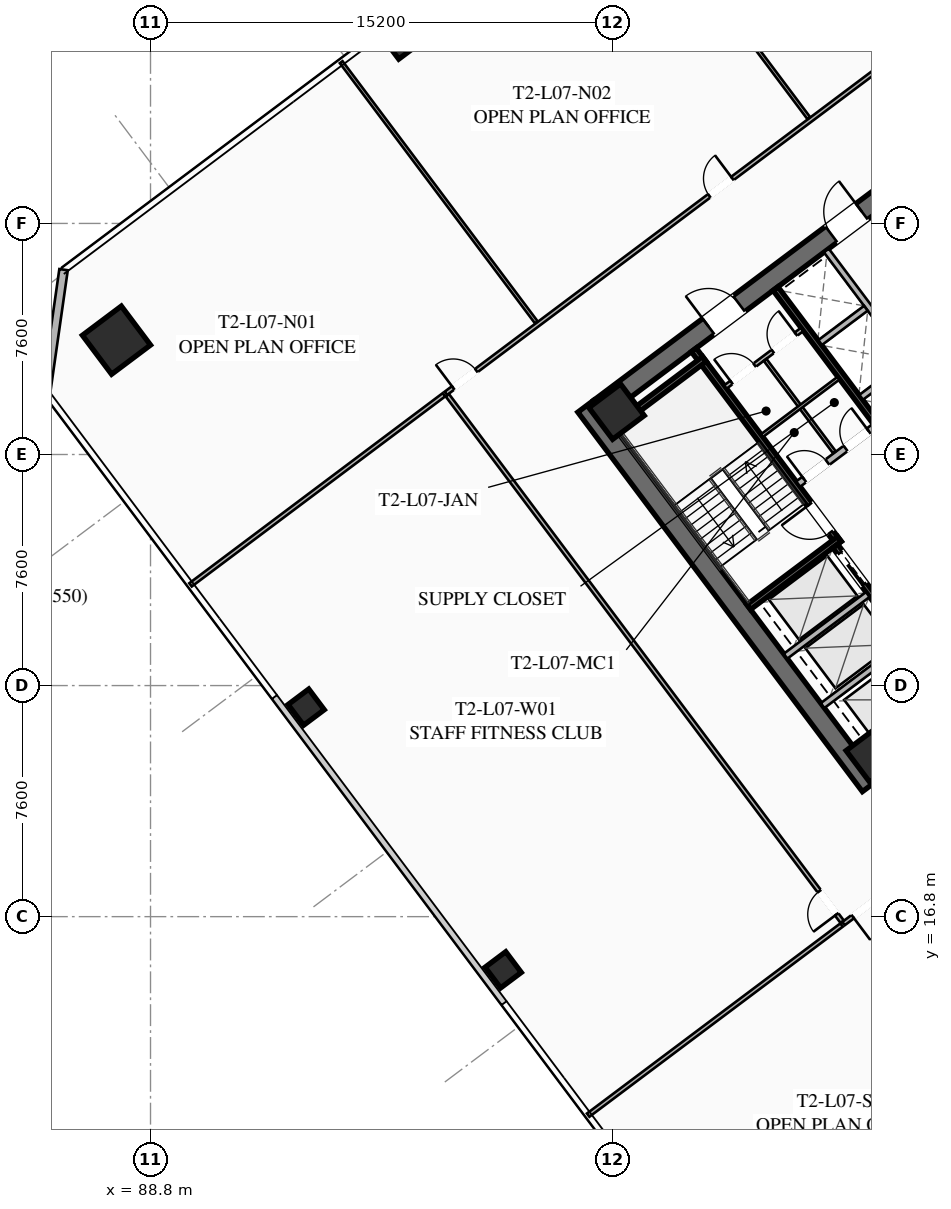
"""IFC4 building model, lengths in metres.
Left out: names, types, materials, properties, quantities, classifications, styles, units other than length and angle.
Written with IfcOpenShell. Run it as: python <this file> out.ifc"""

import sys

from ifc_helpers import new_model, si_unit, direction, frame, frame_2d, origin, origin_2d, place, context, subcontext, project, spatial, rectangle, hollow_rectangle, extrude, element, fill, save


model = new_model("IFC4")
c1 = context("Model", 3, precision=1e-05, world=origin(), true_north=direction((0.0, 1.0)))
c2 = subcontext(c1, "Body", "Model", "MODEL_VIEW")
j1 = project(units=[si_unit("LENGTHUNIT", "METRE"), si_unit("PLANEANGLEUNIT", "RADIAN")], contexts=[c1])
p1 = place(None, origin())
s1 = spatial("IfcSite", under=j1, at=p1, CompositionType="ELEMENT")
p2 = place(p1, origin())
s2 = spatial("IfcBuilding", under=s1, at=p2, CompositionType="ELEMENT")
p3 = place(p2, frame((0.0, 0.0, 31.7)))
s3 = spatial("IfcBuildingStorey", under=s2, at=p3, CompositionType="ELEMENT", Elevation=31.7)
p4 = place(p3, frame((112.476, 21.107, 0.0), z_axis=(0.0, 0.0, 1.0), x_axis=(-0.600005007985, 0.799996243986, 0.0)))
e1 = element("IfcWall", 1, at=p4, inside=s3, PredefinedType="SHEAR", context=c2, shape_type="SweptSolid", body=[
    extrude(rectangle(XDim=15.6, YDim=0.65, at=frame_2d((7.8, 0.0))), origin(), (0.0, 0.0, 1.0), 3.55),
])
p5 = place(p3, frame((124.429, 30.478, 0.0), z_axis=(0.0, 0.0, 1.0), x_axis=(-0.799998028465, -0.600002628705, 0.0)))
e2 = element("IfcWall", 2, at=p5, inside=s3, PredefinedType="SHEAR", context=c2, shape_type="SweptSolid", body=[
    extrude(rectangle(XDim=14.86, YDim=0.65, at=frame_2d((7.43, 0.0))), origin(), (0.0, 0.0, 1.0), 3.55),
])
p6 = place(p5, frame((9.13, 0.0, 0.0)))
e3 = element("IfcOpeningElement", 3, at=p6, cuts=e2, PredefinedType="OPENING", context=c2, shape_type="SweptSolid", body=[
    extrude(rectangle(XDim=1.25, YDim=2.25, at=frame_2d((0.625, 1.125))), frame((0.0, 0.335, 0.0), z_axis=(0.0, -1.0, 0.0), x_axis=(1.0, 0.0, 0.0)), (0.0, 0.0, 1.0), 0.67),
])
p7 = place(p5, frame((4.08, 0.0, 0.0)))
e4 = element("IfcOpeningElement", 4, at=p7, cuts=e2, PredefinedType="OPENING", context=c2, shape_type="SweptSolid", body=[
    extrude(rectangle(XDim=1.25, YDim=2.25, at=frame_2d((0.625, 1.125))), frame((0.0, 0.335, 0.0), z_axis=(0.0, -1.0, 0.0), x_axis=(1.0, 0.0, 0.0)), (0.0, 0.0, 1.0), 0.67),
])
p8 = place(p3, frame((103.571, 33.522, 0.0), z_axis=(0.0, 0.0, 1.0), x_axis=(0.799998028465, 0.600002628705, 0.0)))
e5 = element("IfcWall", 5, at=p8, inside=s3, PredefinedType="SHEAR", context=c2, shape_type="SweptSolid", body=[
    extrude(rectangle(XDim=14.86, YDim=0.65, at=frame_2d((7.43, 0.0))), origin(), (0.0, 0.0, 1.0), 3.55),
])
p9 = place(p8, frame((4.48, 0.0, 0.0)))
e6 = element("IfcOpeningElement", 6, at=p9, cuts=e5, PredefinedType="OPENING", context=c2, shape_type="SweptSolid", body=[
    extrude(rectangle(XDim=1.25, YDim=2.25, at=frame_2d((0.625, 1.125))), frame((0.0, 0.335, 0.0), z_axis=(0.0, -1.0, 0.0), x_axis=(1.0, 0.0, 0.0)), (0.0, 0.0, 1.0), 0.67),
])
p10 = place(p8, frame((9.53, 0.0, 0.0)))
e7 = element("IfcOpeningElement", 7, at=p10, cuts=e5, PredefinedType="OPENING", context=c2, shape_type="SweptSolid", body=[
    extrude(rectangle(XDim=1.25, YDim=2.25, at=frame_2d((0.625, 1.125))), frame((0.0, 0.335, 0.0), z_axis=(0.0, -1.0, 0.0), x_axis=(1.0, 0.0, 0.0)), (0.0, 0.0, 1.0), 0.67),
])
for number, where, z_axis, x_axis in (
    (8, (112.59, 22.13, 0.0), (0.0, 0.0, 1.0), (0.8, 0.6, 0.0)),
    (9, (104.13, 33.41, 0.0), (0.0, 0.0, 1.0), (0.8, 0.6, 0.0)),
):
    element("IfcColumn", number, at=place(p3, frame(where, z_axis=z_axis, x_axis=x_axis)), inside=s3, PredefinedType="COLUMN", context=c2, shape_type="SweptSolid", body=[
        extrude(hollow_rectangle(XDim=1.3, YDim=1.3, WallThickness=0.05, at=origin_2d()), origin(), (0.0, 0.0, 1.0), 3.35),
    ])
p11 = place(p3, frame((87.68, 35.76, 0.0), z_axis=(0.0, 0.0, 1.0), x_axis=(0.799999996291, 0.600000004945, 0.0)))
e10 = element("IfcColumn", 10, at=p11, inside=s3, PredefinedType="COLUMN", context=c2, shape_type="SweptSolid", body=[
    extrude(hollow_rectangle(XDim=1.6, YDim=1.6, WallThickness=0.06, at=origin_2d()), origin(), (0.0, 0.0, 1.0), 3.35),
])
for number, where, z_axis, x_axis in (
    (11, (97.05, 45.6, 0.0), (0.0, 0.0, 1.0), (0.8, 0.6, 0.0)),
    (12, (93.92, 23.69, 0.0), (0.0, 0.0, 1.0), (0.8, 0.6, 0.0)),
    (13, (100.4, 15.05, 0.0), (0.0, 0.0, 1.0), (0.8, 0.6, 0.0)),
):
    element("IfcColumn", number, at=place(p3, frame(where, z_axis=z_axis, x_axis=x_axis)), inside=s3, PredefinedType="COLUMN", context=c2, shape_type="SweptSolid", body=[
        extrude(hollow_rectangle(XDim=0.85, YDim=0.85, WallThickness=0.035, at=origin_2d()), origin(), (0.0, 0.0, 1.0), 3.35),
    ])
p12 = place(p3, frame((85.36, 34.02, 0.0), z_axis=(0.0, 0.0, 1.0), x_axis=(0.14137968631, 0.989955445613, 0.0)))
e14 = element("IfcWall", 14, at=p12, inside=s3, PredefinedType="SOLIDWALL", context=c2, shape_type="SweptSolid", body=[
    extrude(rectangle(XDim=4.101, YDim=0.28, at=frame_2d((2.051, 0.0))), origin(), (0.0, 0.0, 1.0), 3.35),
])
p13 = place(p3, frame((111.44, 29.08, 0.0), z_axis=(0.0, 0.0, 1.0), x_axis=(-0.600009827119, 0.799992629566, 0.0)))
e15 = element("IfcWall", 15, at=p13, inside=s3, PredefinedType="SHEAR", context=c2, shape_type="SweptSolid", body=[
    extrude(rectangle(XDim=7.95, YDim=0.2, at=frame_2d((3.975, 0.0))), origin(), (0.0, 0.0, 1.0), 3.35),
])
p14 = place(p13, frame((0.45, 0.0, 0.0)))
e16 = element("IfcOpeningElement", 16, at=p14, cuts=e15, PredefinedType="OPENING", context=c2, shape_type="SweptSolid", body=[
    extrude(rectangle(XDim=1.15, YDim=2.2, at=frame_2d((0.575, 1.1))), frame((0.0, 0.11, 0.0), z_axis=(0.0, -1.0, 0.0), x_axis=(1.0, 0.0, 0.0)), (0.0, 0.0, 1.0), 0.22),
])
for number, where, z_axis, x_axis in (
    (17, (108.476, 26.982, 0.0), (0.0, 0.0, 1.0), (0.8, 0.6, 0.0)),
    (18, (104.036, 32.902, 0.0), (0.0, 0.0, 1.0), (0.8, 0.6, 0.0)),
):
    element("IfcWall", number, at=place(p3, frame(where, z_axis=z_axis, x_axis=x_axis)), inside=s3, PredefinedType="SHEAR", context=c2, shape_type="SweptSolid", body=[
        extrude(rectangle(XDim=3.73, YDim=0.2, at=frame_2d((1.865, 0.0))), origin(), (0.0, 0.0, 1.0), 3.35),
    ])
p15 = place(p3, frame((117.938, 26.016, 0.0), z_axis=(0.0, 0.0, 1.0), x_axis=(-0.600005463273, 0.799995902516, 0.0)))
e19 = element("IfcWall", 19, at=p15, inside=s3, PredefinedType="SHEAR", context=c2, shape_type="SweptSolid", body=[
    extrude(rectangle(XDim=14.3, YDim=0.2, at=frame_2d((7.15, 0.0))), origin(), (0.0, 0.0, 1.0), 3.35),
])
p16 = place(p3, frame((110.104, 31.028, 0.0), z_axis=(0.0, 0.0, 1.0), x_axis=(0.800018601094, 0.59997519774, 0.0)))
e20 = element("IfcWall", 20, at=p16, inside=s3, PredefinedType="SOLIDWALL", context=c2, shape_type="SweptSolid", body=[
    extrude(rectangle(XDim=3.15, YDim=0.22, at=frame_2d((1.575, 0.0))), origin(), (0.0, 0.0, 1.0), 2.703),
])
p17 = place(p16, frame((0.25, 0.0, 0.0)))
e21 = element("IfcOpeningElement", 21, at=p17, cuts=e20, PredefinedType="OPENING", context=c2, shape_type="SweptSolid", body=[
    extrude(rectangle(XDim=0.95, YDim=2.05, at=frame_2d((0.475, 1.025))), frame((0.0, 0.12, 0.0), z_axis=(0.0, -1.0, 0.0), x_axis=(1.0, 0.0, 0.0)), (0.0, 0.0, 1.0), 0.24),
])
p18 = place(p16, frame((1.95, 0.0, 0.0)))
e22 = element("IfcOpeningElement", 22, at=p18, cuts=e20, PredefinedType="OPENING", context=c2, shape_type="SweptSolid", body=[
    extrude(rectangle(XDim=0.95, YDim=2.05, at=frame_2d((0.475, 1.025))), frame((0.0, 0.12, 0.0), z_axis=(0.0, -1.0, 0.0), x_axis=(1.0, 0.0, 0.0)), (0.0, 0.0, 1.0), 0.24),
])
p19 = place(p3, frame((115.13, 23.91, 0.0), z_axis=(0.0, 0.0, 1.0), x_axis=(-0.599975393228, 0.800018454488, 0.0)))
e23 = element("IfcWall", 23, at=p19, inside=s3, PredefinedType="SHEAR", context=c2, shape_type="SweptSolid", body=[
    extrude(rectangle(XDim=6.35, YDim=0.2, at=frame_2d((3.175, 0.0))), origin(), (0.0, 0.0, 1.0), 3.35),
])
p20 = place(p19, frame((4.775, 0.0, 0.0)))
e24 = element("IfcOpeningElement", 24, at=p20, cuts=e23, PredefinedType="OPENING", context=c2, shape_type="SweptSolid", body=[
    extrude(rectangle(XDim=1.3, YDim=2.25, at=frame_2d((0.65, 1.125))), frame((0.0, 0.11, 0.0), z_axis=(0.0, -1.0, 0.0), x_axis=(1.0, 0.0, 0.0)), (0.0, 0.0, 1.0), 0.22),
])
p21 = place(p19, frame((2.775, 0.0, 0.0)))
e25 = element("IfcOpeningElement", 25, at=p21, cuts=e23, PredefinedType="OPENING", context=c2, shape_type="SweptSolid", body=[
    extrude(rectangle(XDim=1.3, YDim=2.25, at=frame_2d((0.65, 1.125))), frame((0.0, 0.11, 0.0), z_axis=(0.0, -1.0, 0.0), x_axis=(1.0, 0.0, 0.0)), (0.0, 0.0, 1.0), 0.22),
])
p22 = place(p19, frame((0.575, 0.0, 0.0)))
e26 = element("IfcOpeningElement", 26, at=p22, cuts=e23, PredefinedType="OPENING", context=c2, shape_type="SweptSolid", body=[
    extrude(rectangle(XDim=1.3, YDim=2.25, at=frame_2d((0.65, 1.125))), frame((0.0, 0.11, 0.0), z_axis=(0.0, -1.0, 0.0), x_axis=(1.0, 0.0, 0.0)), (0.0, 0.0, 1.0), 0.22),
])
for number, where, z_axis, x_axis in (
    (27, (110.906, 23.742, 0.0), (0.0, 0.0, 1.0), (0.8, 0.6, 0.0)),
    (28, (109.688, 25.366, 0.0), (0.0, 0.0, 1.0), (0.8, 0.6, 0.0)),
):
    element("IfcWall", number, at=place(p3, frame(where, z_axis=z_axis, x_axis=x_axis)), inside=s3, PredefinedType="SOLIDWALL", context=c2, shape_type="SweptSolid", body=[
        extrude(rectangle(XDim=3.38, YDim=0.2, at=frame_2d((1.69, 0.0))), origin(), (0.0, 0.0, 1.0), 3.35),
    ])
p23 = place(p3, frame((107.71, 34.22, 0.0), z_axis=(0.0, 0.0, 1.0), x_axis=(0.799981399002, 0.60002480053, 0.0)))
e29 = element("IfcWall", 29, at=p23, inside=s3, PredefinedType="PARTITIONING", context=c2, shape_type="SweptSolid", body=[
    extrude(rectangle(XDim=3.15, YDim=0.135, at=frame_2d((1.575, 0.0))), origin(), (0.0, 0.0, 1.0), 2.703),
])
p24 = place(p23, frame((0.25, 0.0, 0.0)))
e30 = element("IfcOpeningElement", 30, at=p24, cuts=e29, PredefinedType="OPENING", context=c2, shape_type="SweptSolid", body=[
    extrude(rectangle(XDim=0.95, YDim=2.05, at=frame_2d((0.475, 1.025))), frame((0.0, 0.077, 0.0), z_axis=(0.0, -1.0, 0.0), x_axis=(1.0, 0.0, 0.0)), (0.0, 0.0, 1.0), 0.155),
])
p25 = place(p23, frame((1.95, 0.0, 0.0)))
e31 = element("IfcOpeningElement", 31, at=p25, cuts=e29, PredefinedType="OPENING", context=c2, shape_type="SweptSolid", body=[
    extrude(rectangle(XDim=0.95, YDim=2.05, at=frame_2d((0.475, 1.025))), frame((0.0, 0.077, 0.0), z_axis=(0.0, -1.0, 0.0), x_axis=(1.0, 0.0, 0.0)), (0.0, 0.0, 1.0), 0.155),
])
p26 = place(p3, frame((111.296, 32.072, 0.0), z_axis=(0.0, 0.0, 1.0), x_axis=(-0.59995887973, 0.800030838552, 0.0)))
e32 = element("IfcWall", 32, at=p26, inside=s3, PredefinedType="PARTITIONING", context=c2, shape_type="SweptSolid", body=[
    extrude(rectangle(XDim=3.8, YDim=0.11, at=frame_2d((1.9, 0.0))), origin(), (0.0, 0.0, 1.0), 2.703),
])
p27 = place(p3, frame((108.91, 32.62, 0.0), z_axis=(0.0, 0.0, 1.0), x_axis=(0.800018601094, 0.59997519774, 0.0)))
e33 = element("IfcWall", 33, at=p27, inside=s3, PredefinedType="PARTITIONING", context=c2, shape_type="SweptSolid", body=[
    extrude(rectangle(XDim=3.15, YDim=0.11, at=frame_2d((1.575, 0.0))), origin(), (0.0, 0.0, 1.0), 2.703),
])
p28 = place(p3, frame((115.11, 33.27, 0.0), z_axis=(0.0, 0.0, 1.0), x_axis=(-0.600011488909, 0.79999138319, 0.0)))
e34 = element("IfcWall", 34, at=p28, inside=s3, PredefinedType="SOLIDWALL", context=c2, shape_type="SweptSolid", body=[
    extrude(rectangle(XDim=6.8, YDim=0.2, at=frame_2d((3.4, 0.0))), origin(), (0.0, 0.0, 1.0), 3.35),
])
p29 = place(p3, frame((112.176, 33.882, 0.0), z_axis=(0.0, 0.0, 1.0), x_axis=(0.8, 0.6, 0.0)))
e35 = element("IfcWall", 35, at=p29, inside=s3, PredefinedType="SOLIDWALL", context=c2, shape_type="SweptSolid", body=[
    extrude(rectangle(XDim=1.88, YDim=0.2, at=frame_2d((0.94, 0.0))), origin(), (0.0, 0.0, 1.0), 3.35),
])
p30 = place(p3, frame((110.826, 35.682, 0.0), z_axis=(0.0, 0.0, 1.0), x_axis=(0.799984418148, 0.600020775241, 0.0)))
e36 = element("IfcWall", 36, at=p30, inside=s3, PredefinedType="SOLIDWALL", context=c2, shape_type="SweptSolid", body=[
    extrude(rectangle(XDim=1.88, YDim=0.2, at=frame_2d((0.94, 0.0))), origin(), (0.0, 0.0, 1.0), 3.35),
])
p31 = place(p3, frame((98.516, 34.012, 0.0), z_axis=(0.0, 0.0, 1.0), x_axis=(0.799998035726, 0.600002619023, 0.0)))
e37 = element("IfcWall", 37, at=p31, inside=s3, PredefinedType="PARTITIONING", context=c2, shape_type="SweptSolid", body=[
    extrude(rectangle(XDim=29.83, YDim=0.135, at=frame_2d((14.915, 0.0))), origin(), (0.0, 0.0, 1.0), 2.703),
])
p32 = place(p31, frame((0.3, 0.0, 0.0)))
e38 = element("IfcOpeningElement", 38, at=p32, cuts=e37, PredefinedType="OPENING", context=c2, shape_type="SweptSolid", body=[
    extrude(rectangle(XDim=0.95, YDim=2.05, at=frame_2d((0.475, 1.025))), frame((0.0, 0.077, 0.0), z_axis=(0.0, -1.0, 0.0), x_axis=(1.0, 0.0, 0.0)), (0.0, 0.0, 1.0), 0.155),
])
p33 = place(p31, frame((10.829, 0.0, 0.0)))
e39 = element("IfcOpeningElement", 39, at=p33, cuts=e37, PredefinedType="OPENING", context=c2, shape_type="SweptSolid", body=[
    extrude(rectangle(XDim=0.95, YDim=2.05, at=frame_2d((0.475, 1.025))), frame((0.0, 0.077, 0.0), z_axis=(0.0, -1.0, 0.0), x_axis=(1.0, 0.0, 0.0)), (0.0, 0.0, 1.0), 0.155),
])
p34 = place(p31, frame((28.58, 0.0, 0.0)))
e40 = element("IfcOpeningElement", 40, at=p34, cuts=e37, PredefinedType="OPENING", context=c2, shape_type="SweptSolid", body=[
    extrude(rectangle(XDim=0.95, YDim=2.05, at=frame_2d((0.475, 1.025))), frame((0.0, 0.077, 0.0), z_axis=(0.0, -1.0, 0.0), x_axis=(1.0, 0.0, 0.0)), (0.0, 0.0, 1.0), 0.155),
])
for number, where, z_axis, x_axis in (
    (41, (101.492, 36.344, 0.0), (0.0, 0.0, 1.0), (-0.6, 0.8, 0.0)),
    (42, (110.452, 43.064, 0.0), (0.0, 0.0, 1.0), (-0.6, 0.8, 0.0)),
):
    element("IfcWall", number, at=place(p3, frame(where, z_axis=z_axis, x_axis=x_axis)), inside=s3, PredefinedType="PARTITIONING", context=c2, shape_type="SweptSolid", body=[
        extrude(rectangle(XDim=10.7, YDim=0.11, at=frame_2d((5.35, 0.0))), origin(), (0.0, 0.0, 1.0), 2.703),
    ])
p35 = place(p3, frame((135.46, 34.47, 0.0), z_axis=(0.0, 0.0, 1.0), x_axis=(-0.800000982127, -0.599998690494, 0.0)))
e43 = element("IfcWall", 43, at=p35, inside=s3, PredefinedType="PARTITIONING", context=c2, shape_type="SweptSolid", body=[
    extrude(rectangle(XDim=29.83, YDim=0.135, at=frame_2d((14.915, 0.0))), origin(), (0.0, 0.0, 1.0), 2.703),
])
p36 = place(p35, frame((28.5, 0.0, 0.0)))
e44 = element("IfcOpeningElement", 44, at=p36, cuts=e43, PredefinedType="OPENING", context=c2, shape_type="SweptSolid", body=[
    extrude(rectangle(XDim=0.95, YDim=2.05, at=frame_2d((0.475, 1.025))), frame((0.0, 0.077, 0.0), z_axis=(0.0, -1.0, 0.0), x_axis=(1.0, 0.0, 0.0)), (0.0, 0.0, 1.0), 0.155),
])
p37 = place(p35, frame((18.075, 0.0, 0.0)))
e45 = element("IfcOpeningElement", 45, at=p37, cuts=e43, PredefinedType="OPENING", context=c2, shape_type="SweptSolid", body=[
    extrude(rectangle(XDim=0.95, YDim=2.05, at=frame_2d((0.475, 1.025))), frame((0.0, 0.077, 0.0), z_axis=(0.0, -1.0, 0.0), x_axis=(1.0, 0.0, 0.0)), (0.0, 0.0, 1.0), 0.155),
])
p38 = place(p35, frame((0.38, 0.0, 0.0)))
e46 = element("IfcOpeningElement", 46, at=p38, cuts=e43, PredefinedType="OPENING", context=c2, shape_type="SweptSolid", body=[
    extrude(rectangle(XDim=0.95, YDim=2.05, at=frame_2d((0.475, 1.025))), frame((0.0, 0.077, 0.0), z_axis=(0.0, -1.0, 0.0), x_axis=(1.0, 0.0, 0.0)), (0.0, 0.0, 1.0), 0.155),
])
p39 = place(p3, frame((111.548, 16.636, 0.0), z_axis=(0.0, 0.0, 1.0), x_axis=(-0.600003610192, 0.799997292343, 0.0)))
e47 = element("IfcWall", 47, at=p39, inside=s3, PredefinedType="PARTITIONING", context=c2, shape_type="SweptSolid", body=[
    extrude(rectangle(XDim=21.64, YDim=0.135, at=frame_2d((10.82, 0.0))), origin(), (0.0, 0.0, 1.0), 2.703),
])
p40 = place(p39, frame((0.3, 0.0, 0.0)))
e48 = element("IfcOpeningElement", 48, at=p40, cuts=e47, PredefinedType="OPENING", context=c2, shape_type="SweptSolid", body=[
    extrude(rectangle(XDim=0.95, YDim=2.05, at=frame_2d((0.475, 1.025))), frame((0.0, 0.077, 0.0), z_axis=(0.0, -1.0, 0.0), x_axis=(1.0, 0.0, 0.0)), (0.0, 0.0, 1.0), 0.155),
])
p41 = place(p3, frame((98.452, 33.964, 0.0), z_axis=(0.0, 0.0, 1.0), x_axis=(-0.799988753532, -0.600014994998, 0.0)))
e49 = element("IfcWall", 49, at=p41, inside=s3, PredefinedType="PARTITIONING", context=c2, shape_type="SweptSolid", body=[
    extrude(rectangle(XDim=10.42, YDim=0.135, at=frame_2d((5.21, 0.0))), origin(), (0.0, 0.0, 1.0), 2.703),
])
p42 = place(p3, frame((103.196, 10.272, 0.0), z_axis=(0.0, 0.0, 1.0), x_axis=(0.8, 0.6, 0.0)))
e50 = element("IfcWall", 50, at=p42, inside=s3, PredefinedType="PARTITIONING", context=c2, shape_type="SweptSolid", body=[
    extrude(rectangle(XDim=10.42, YDim=0.135, at=frame_2d((5.21, 0.0))), origin(), (0.0, 0.0, 1.0), 2.703),
])
p43 = place(p9, origin())
e51 = element("IfcDoor", 51, at=p43, inside=s3, OperationType="SINGLE_SWING_LEFT", PredefinedType="DOOR", context=c2, shape_type="SweptSolid", body=[
    extrude(rectangle(XDim=1.25, YDim=2.25, at=frame_2d((0.625, 1.125))), frame((0.0, 0.025, 0.0), z_axis=(0.0, -1.0, 0.0), x_axis=(1.0, 0.0, 0.0)), (0.0, 0.0, 1.0), 0.05),
])
fill(e6, e51)
p44 = place(p10, origin())
e52 = element("IfcDoor", 52, at=p44, inside=s3, OperationType="SINGLE_SWING_RIGHT", PredefinedType="DOOR", context=c2, shape_type="SweptSolid", body=[
    extrude(rectangle(XDim=1.25, YDim=2.25, at=frame_2d((0.625, 1.125))), frame((0.0, 0.025, 0.0), z_axis=(0.0, -1.0, 0.0), x_axis=(1.0, 0.0, 0.0)), (0.0, 0.0, 1.0), 0.05),
])
fill(e7, e52)
p45 = place(p14, origin())
e53 = element("IfcDoor", 53, at=p45, inside=s3, OperationType="SINGLE_SWING_RIGHT", PredefinedType="DOOR", context=c2, shape_type="SweptSolid", body=[
    extrude(rectangle(XDim=1.15, YDim=2.2, at=frame_2d((0.575, 1.1))), frame((0.0, 0.025, 0.0), z_axis=(0.0, -1.0, 0.0), x_axis=(1.0, 0.0, 0.0)), (0.0, 0.0, 1.0), 0.05),
])
fill(e16, e53)
p46 = place(p24, origin())
e54 = element("IfcDoor", 54, at=p46, inside=s3, OperationType="SINGLE_SWING_LEFT", PredefinedType="DOOR", context=c2, shape_type="SweptSolid", body=[
    extrude(rectangle(XDim=0.95, YDim=2.05, at=frame_2d((0.475, 1.025))), frame((0.0, 0.025, 0.0), z_axis=(0.0, -1.0, 0.0), x_axis=(1.0, 0.0, 0.0)), (0.0, 0.0, 1.0), 0.05),
])
fill(e30, e54)
p47 = place(p25, origin())
e55 = element("IfcDoor", 55, at=p47, inside=s3, OperationType="SINGLE_SWING_RIGHT", PredefinedType="DOOR", context=c2, shape_type="SweptSolid", body=[
    extrude(rectangle(XDim=0.95, YDim=2.05, at=frame_2d((0.475, 1.025))), frame((0.0, 0.025, 0.0), z_axis=(0.0, -1.0, 0.0), x_axis=(1.0, 0.0, 0.0)), (0.0, 0.0, 1.0), 0.05),
])
fill(e31, e55)
p48 = place(p17, origin())
e56 = element("IfcDoor", 56, at=p48, inside=s3, OperationType="SINGLE_SWING_LEFT", PredefinedType="DOOR", context=c2, shape_type="SweptSolid", body=[
    extrude(rectangle(XDim=0.95, YDim=2.05, at=frame_2d((0.475, 1.025))), frame((0.0, 0.025, 0.0), z_axis=(0.0, -1.0, 0.0), x_axis=(1.0, 0.0, 0.0)), (0.0, 0.0, 1.0), 0.05),
])
fill(e21, e56)
p49 = place(p18, origin())
e57 = element("IfcDoor", 57, at=p49, inside=s3, OperationType="SINGLE_SWING_RIGHT", PredefinedType="DOOR", context=c2, shape_type="SweptSolid", body=[
    extrude(rectangle(XDim=0.95, YDim=2.05, at=frame_2d((0.475, 1.025))), frame((0.0, 0.025, 0.0), z_axis=(0.0, -1.0, 0.0), x_axis=(1.0, 0.0, 0.0)), (0.0, 0.0, 1.0), 0.05),
])
fill(e22, e57)
p50 = place(p32, origin())
e58 = element("IfcDoor", 58, at=p50, inside=s3, OperationType="SINGLE_SWING_LEFT", PredefinedType="DOOR", context=c2, shape_type="SweptSolid", body=[
    extrude(rectangle(XDim=0.95, YDim=2.05, at=frame_2d((0.475, 1.025))), frame((0.0, 0.025, 0.0), z_axis=(0.0, -1.0, 0.0), x_axis=(1.0, 0.0, 0.0)), (0.0, 0.0, 1.0), 0.05),
])
fill(e38, e58)
p51 = place(p33, origin())
e59 = element("IfcDoor", 59, at=p51, inside=s3, OperationType="SINGLE_SWING_RIGHT", PredefinedType="DOOR", context=c2, shape_type="SweptSolid", body=[
    extrude(rectangle(XDim=0.95, YDim=2.05, at=frame_2d((0.475, 1.025))), frame((0.0, 0.025, 0.0), z_axis=(0.0, -1.0, 0.0), x_axis=(1.0, 0.0, 0.0)), (0.0, 0.0, 1.0), 0.05),
])
fill(e39, e59)
p52 = place(p36, origin())
e60 = element("IfcDoor", 60, at=p52, inside=s3, OperationType="SINGLE_SWING_RIGHT", PredefinedType="DOOR", context=c2, shape_type="SweptSolid", body=[
    extrude(rectangle(XDim=0.95, YDim=2.05, at=frame_2d((0.475, 1.025))), frame((0.0, 0.025, 0.0), z_axis=(0.0, -1.0, 0.0), x_axis=(1.0, 0.0, 0.0)), (0.0, 0.0, 1.0), 0.05),
])
fill(e44, e60)
p53 = place(p40, origin())
e61 = element("IfcDoor", 61, at=p53, inside=s3, OperationType="SINGLE_SWING_LEFT", PredefinedType="DOOR", context=c2, shape_type="SweptSolid", body=[
    extrude(rectangle(XDim=0.95, YDim=2.05, at=frame_2d((0.475, 1.025))), frame((0.0, 0.025, 0.0), z_axis=(0.0, -1.0, 0.0), x_axis=(1.0, 0.0, 0.0)), (0.0, 0.0, 1.0), 0.05),
])
fill(e48, e61)
p54 = place(p20, origin())
e62 = element("IfcDoor", 62, at=p54, inside=s3, OperationType="SLIDING_TO_LEFT", PredefinedType="DOOR", context=c2, shape_type="SweptSolid", body=[
    extrude(rectangle(XDim=1.3, YDim=2.25, at=frame_2d((0.65, 1.125))), frame((0.0, 0.025, 0.0), z_axis=(0.0, -1.0, 0.0), x_axis=(1.0, 0.0, 0.0)), (0.0, 0.0, 1.0), 0.05),
])
fill(e24, e62)
save(model, sys.argv[1])
